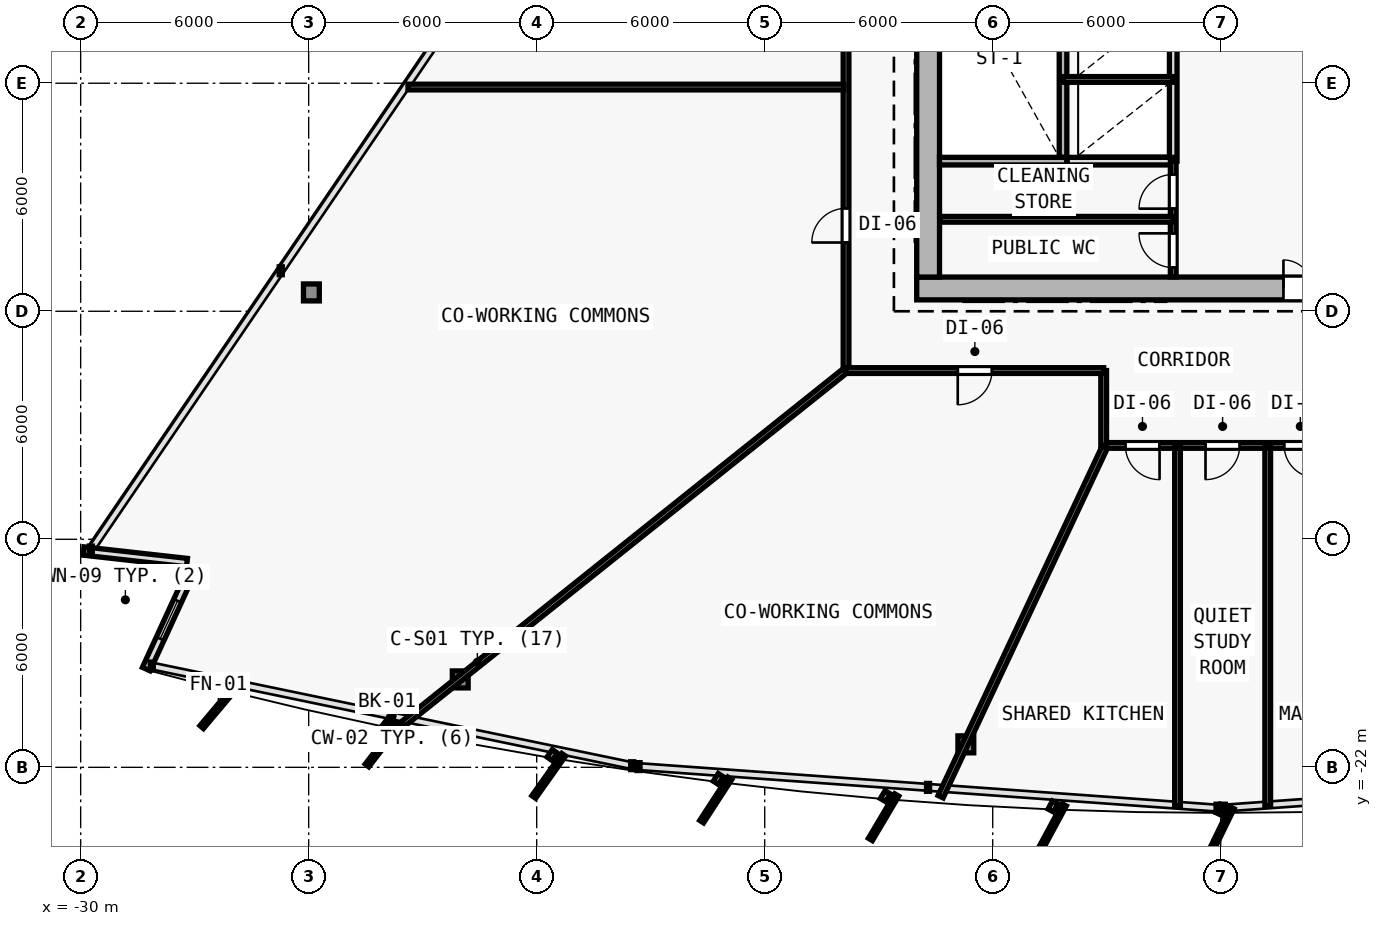
"""IFC4 building model, lengths in metres.
Left out: names, types, materials, properties, quantities, classifications, styles, units other than length and angle.
Written with IfcOpenShell. Run it as: python <this file> out.ifc"""

import sys

from ifc_helpers import new_model, si_unit, direction, frame, frame_2d, origin, origin_2d, place, context, subcontext, project, spatial, rectangle, i_section, extrude, element, fill, save


model = new_model("IFC4")
c1 = context("Model", 3, precision=1e-05, world=origin(), true_north=direction((0.0, 1.0)))
c2 = subcontext(c1, "Body", "Model", "MODEL_VIEW")
j1 = project(units=[si_unit("LENGTHUNIT", "METRE"), si_unit("PLANEANGLEUNIT", "RADIAN")], contexts=[c1])
p1 = place(None, origin())
s1 = spatial("IfcSite", under=j1, at=p1, CompositionType="ELEMENT")
p2 = place(p1, origin())
s2 = spatial("IfcBuilding", under=s1, at=p2, CompositionType="ELEMENT")
p3 = place(p2, frame((0.0, 0.0, 44.4)))
s3 = spatial("IfcBuildingStorey", under=s2, at=p3, CompositionType="ELEMENT", Elevation=44.4)
for number, where, z_axis, x_axis in (
    (1, (-7.7, -9.4, 0.0), (0.0, 0.0, 1.0), (1.0, 0.0, 0.0)),
    (2, (0.0, -9.4, 0.0), (0.0, 0.0, 1.0), (1.0, 0.0, 0.0)),
):
    element("IfcColumn", number, at=place(p3, frame(where, z_axis=z_axis, x_axis=x_axis)), inside=s3, PredefinedType="COLUMN", context=c2, shape_type="SweptSolid", body=[
        extrude(i_section(OverallWidth=0.416, OverallDepth=0.446, WebThickness=0.025, FlangeThickness=0.04, FilletRadius=0.015, at=origin_2d()), origin(), (0.0, 0.0, 1.0), 3.6),
    ])
p4 = place(p3, frame((-20.012, -19.687, 0.006), z_axis=(0.020596245868, 0.03357935795, 0.999223809452), x_axis=(-0.852427604955, 0.522845271865, 0.0)))
e3 = element("IfcColumn", 3, at=p4, inside=s3, PredefinedType="COLUMN", context=c2, shape_type="SweptSolid", body=[
    extrude(i_section(OverallWidth=0.416, OverallDepth=0.446, WebThickness=0.025, FlangeThickness=0.04, FilletRadius=0.015, at=origin_2d()), origin(), (0.0, 0.0, 1.0), 3.592),
])
p5 = place(p3, frame((-6.707, -21.395, 0.006), z_axis=(0.006934288159, 0.035283289748, 0.999353293441), x_axis=(-0.981229659911, 0.192842823335, 0.0)))
e4 = element("IfcColumn", 4, at=p5, inside=s3, PredefinedType="COLUMN", context=c2, shape_type="SweptSolid", body=[
    extrude(i_section(OverallWidth=0.416, OverallDepth=0.446, WebThickness=0.025, FlangeThickness=0.04, FilletRadius=0.015, at=origin_2d()), origin(), (0.0, 0.0, 1.0), 3.591),
])
p6 = place(p3, frame((-23.929, -9.504, 0.006), z_axis=(0.025224163578, 0.021620711639, 0.999447990843), x_axis=(-0.650791373456, 0.759256602365, 0.0)))
e5 = element("IfcColumn", 5, at=p6, inside=s3, PredefinedType="COLUMN", context=c2, shape_type="SweptSolid", body=[
    extrude(i_section(OverallWidth=0.416, OverallDepth=0.446, WebThickness=0.025, FlangeThickness=0.04, FilletRadius=0.015, at=origin_2d()), origin(), (0.0, 0.0, 1.0), 3.591),
])
p7 = place(p3, frame((-27.202, -16.612, 0.0), z_axis=(0.0, 0.0, 1.0), x_axis=(-0.993822658088, 0.110979837223, 0.0)))
e6 = element("IfcWall", 6, at=p7, inside=s3, PredefinedType="SOLIDWALL", context=c2, shape_type="SweptSolid", body=[
    extrude(rectangle(XDim=2.737, YDim=0.22, at=frame_2d((1.368, 0.0))), origin(), (0.0, 0.0, 1.0), 3.35),
])
p8 = place(p3, frame((-28.274, -19.414, 0.0), z_axis=(0.0, 0.0, 1.0), x_axis=(0.417521186742, 0.908667188041, 0.0)))
e7 = element("IfcWall", 7, at=p8, inside=s3, PredefinedType="SOLIDWALL", context=c2, shape_type="SweptSolid", body=[
    extrude(rectangle(XDim=2.852, YDim=0.22, at=frame_2d((1.426, 0.0))), origin(), (0.0, 0.0, 1.0), 3.35),
])
p9 = place(p8, frame((0.876, 0.0, 0.62)))
e8 = element("IfcOpeningElement", 8, at=p9, cuts=e7, PredefinedType="OPENING", context=c2, shape_type="SweptSolid", body=[
    extrude(rectangle(XDim=1.1, YDim=1.8, at=frame_2d((0.55, 0.9))), frame((0.0, 0.12, 0.0), z_axis=(0.0, -1.0, 0.0), x_axis=(1.0, 0.0, 0.0)), (0.0, 0.0, 1.0), 0.24),
])
p10 = place(p3, frame((-8.0, -9.4, 0.0), z_axis=(0.0, 0.0, 1.0), x_axis=(1.0, 0.0, 0.0)))
e9 = element("IfcWall", 9, at=p10, inside=s3, PredefinedType="SHEAR", context=c2, shape_type="SweptSolid", body=[
    extrude(rectangle(XDim=16.0, YDim=0.6, at=frame_2d((8.0, 0.0))), origin(), (0.0, 0.0, 1.0), 3.35),
])
p11 = place(p10, frame((9.65, 0.0, 0.0)))
e10 = element("IfcOpeningElement", 10, at=p11, cuts=e9, PredefinedType="OPENING", context=c2, shape_type="SweptSolid", body=[
    extrude(rectangle(XDim=1.5, YDim=2.2, at=frame_2d((0.75, 1.1))), frame((0.0, 0.31, 0.0), z_axis=(0.0, -1.0, 0.0), x_axis=(1.0, 0.0, 0.0)), (0.0, 0.0, 1.0), 0.62),
])
p12 = place(p3, frame((-7.7, -9.1, 0.0), z_axis=(0.0, 0.0, 1.0), x_axis=(0.0, 1.0, 0.0)))
e11 = element("IfcWall", 11, at=p12, inside=s3, PredefinedType="SHEAR", context=c2, shape_type="SweptSolid", body=[
    extrude(rectangle(XDim=19.0, YDim=0.6, at=frame_2d((9.5, 0.0))), origin(), (0.0, 0.0, 1.0), 3.35),
])
p13 = place(p12, frame((12.65, 0.0, 0.0)))
e12 = element("IfcOpeningElement", 12, at=p13, cuts=e11, PredefinedType="OPENING", context=c2, shape_type="SweptSolid", body=[
    extrude(rectangle(XDim=1.1, YDim=2.15, at=frame_2d((0.55, 1.075))), frame((0.0, 0.31, 0.0), z_axis=(0.0, -1.0, 0.0), x_axis=(1.0, 0.0, 0.0)), (0.0, 0.0, 1.0), 0.62),
])
p14 = place(p3, frame((-4.15, -5.95, 0.0), z_axis=(0.0, 0.0, 1.0), x_axis=(0.0, 1.0, 0.0)))
e13 = element("IfcWall", 13, at=p14, inside=s3, PredefinedType="SOLIDWALL", context=c2, shape_type="SweptSolid", body=[
    extrude(rectangle(XDim=7.2, YDim=0.2, at=frame_2d((3.6, 0.0))), origin(), (0.0, 0.0, 1.0), 3.35),
])
p15 = place(p3, frame((-1.25, -6.05, 0.0), z_axis=(0.0, 0.0, 1.0), x_axis=(0.0, 1.0, 0.0)))
e14 = element("IfcWall", 14, at=p15, inside=s3, PredefinedType="SOLIDWALL", context=c2, shape_type="SweptSolid", body=[
    extrude(rectangle(XDim=8.7, YDim=0.2, at=frame_2d((4.35, 0.0))), origin(), (0.0, 0.0, 1.0), 3.35),
])
p16 = place(p3, frame((-4.15, -3.9, 0.0), z_axis=(0.0, 0.0, 1.0), x_axis=(1.0, 0.0, 0.0)))
e15 = element("IfcWall", 15, at=p16, inside=s3, PredefinedType="PARTITIONING", context=c2, shape_type="SweptSolid", body=[
    extrude(rectangle(XDim=2.9, YDim=0.15, at=frame_2d((1.45, 0.0))), origin(), (0.0, 0.0, 1.0), 3.35),
])
p17 = place(p3, frame((-7.4, -6.05, 0.0), z_axis=(0.0, 0.0, 1.0), x_axis=(1.0, 0.0, 0.0)))
e16 = element("IfcWall", 16, at=p17, inside=s3, PredefinedType="SOLIDWALL", context=c2, shape_type="SweptSolid", body=[
    extrude(rectangle(XDim=3.35, YDim=0.2, at=frame_2d((1.675, 0.0))), origin(), (0.0, 0.0, 1.0), 3.35),
])
p18 = place(p3, frame((-4.04, -6.05, 0.0), z_axis=(0.0, 0.0, 1.0), x_axis=(1.0, 0.0, 0.0)))
e17 = element("IfcWall", 17, at=p18, inside=s3, PredefinedType="SOLIDWALL", context=c2, shape_type="SweptSolid", body=[
    extrude(rectangle(XDim=2.79, YDim=0.2, at=frame_2d((1.395, 0.0))), origin(), (0.0, 0.0, 1.0), 3.35),
])
p19 = place(p3, frame((-1.25, -9.095, 0.0), z_axis=(0.0, 0.0, 1.0), x_axis=(0.0, 1.0, 0.0)))
e18 = element("IfcWall", 18, at=p19, inside=s3, PredefinedType="PARTITIONING", context=c2, shape_type="SweptSolid", body=[
    extrude(rectangle(XDim=3.045, YDim=0.15, at=frame_2d((1.522, 0.0))), origin(), (0.0, 0.0, 1.0), 3.35),
])
p20 = place(p19, frame((1.795, 0.0, 0.0)))
e19 = element("IfcOpeningElement", 19, at=p20, cuts=e18, PredefinedType="OPENING", context=c2, shape_type="SweptSolid", body=[
    extrude(rectangle(XDim=0.9, YDim=2.1, at=frame_2d((0.45, 1.05))), frame((0.0, 0.085, 0.0), z_axis=(0.0, -1.0, 0.0), x_axis=(1.0, 0.0, 0.0)), (0.0, 0.0, 1.0), 0.17),
])
p21 = place(p19, frame((0.245, 0.0, 0.0)))
e20 = element("IfcOpeningElement", 20, at=p21, cuts=e18, PredefinedType="OPENING", context=c2, shape_type="SweptSolid", body=[
    extrude(rectangle(XDim=0.9, YDim=2.1, at=frame_2d((0.45, 1.05))), frame((0.0, 0.085, 0.0), z_axis=(0.0, -1.0, 0.0), x_axis=(1.0, 0.0, 0.0)), (0.0, 0.0, 1.0), 0.17),
])
p22 = place(p3, frame((-7.395, -7.58, 0.0), z_axis=(0.0, 0.0, 1.0), x_axis=(1.0, 0.0, 0.0)))
e21 = element("IfcWall", 21, at=p22, inside=s3, PredefinedType="PARTITIONING", context=c2, shape_type="SweptSolid", body=[
    extrude(rectangle(XDim=6.145, YDim=0.15, at=frame_2d((3.073, 0.0))), origin(), (0.0, 0.0, 1.0), 3.35),
])
p23 = place(p3, frame((-9.86, -11.56, 0.0), z_axis=(0.0, 0.0, 1.0), x_axis=(0.0, 1.0, 0.0)))
e22 = element("IfcWall", 22, at=p23, inside=s3, PredefinedType="PARTITIONING", context=c2, shape_type="SweptSolid", body=[
    extrude(rectangle(XDim=19.986, YDim=0.15, at=frame_2d((9.993, 0.0))), origin(), (0.0, 0.0, 1.0), 2.609),
])
p24 = place(p23, frame((10.231, 0.0, 0.0)))
e23 = element("IfcOpeningElement", 23, at=p24, cuts=e22, PredefinedType="OPENING", context=c2, shape_type="SweptSolid", body=[
    extrude(rectangle(XDim=0.9, YDim=2.1, at=frame_2d((0.45, 1.05))), frame((0.0, 0.085, 0.0), z_axis=(0.0, -1.0, 0.0), x_axis=(1.0, 0.0, 0.0)), (0.0, 0.0, 1.0), 0.17),
])
p25 = place(p23, frame((3.369, 0.0, 0.0)))
e24 = element("IfcOpeningElement", 24, at=p25, cuts=e22, PredefinedType="OPENING", context=c2, shape_type="SweptSolid", body=[
    extrude(rectangle(XDim=0.9, YDim=2.1, at=frame_2d((0.45, 1.05))), frame((0.0, 0.085, 0.0), z_axis=(0.0, -1.0, 0.0), x_axis=(1.0, 0.0, 0.0)), (0.0, 0.0, 1.0), 0.17),
])
p26 = place(p23, frame((17.979, 0.0, 0.0)))
e25 = element("IfcOpeningElement", 25, at=p26, cuts=e22, PredefinedType="OPENING", context=c2, shape_type="SweptSolid", body=[
    extrude(rectangle(XDim=0.9, YDim=2.1, at=frame_2d((0.45, 1.05))), frame((0.0, 0.085, 0.0), z_axis=(0.0, -1.0, 0.0), x_axis=(1.0, 0.0, 0.0)), (0.0, 0.0, 1.0), 0.17),
])
p27 = place(p23, frame((15.027, 0.0, 0.0)))
e26 = element("IfcOpeningElement", 26, at=p27, cuts=e22, PredefinedType="OPENING", context=c2, shape_type="SweptSolid", body=[
    extrude(rectangle(XDim=0.9, YDim=2.1, at=frame_2d((0.45, 1.05))), frame((0.0, 0.085, 0.0), z_axis=(0.0, -1.0, 0.0), x_axis=(1.0, 0.0, 0.0)), (0.0, 0.0, 1.0), 0.17),
])
p28 = place(p3, frame((3.08, -13.53, 0.0), z_axis=(0.0, 0.0, 1.0), x_axis=(-1.0, 0.0, 0.0)))
e27 = element("IfcWall", 27, at=p28, inside=s3, PredefinedType="PARTITIONING", context=c2, shape_type="SweptSolid", body=[
    extrude(rectangle(XDim=6.16, YDim=0.15, at=frame_2d((3.08, 0.0))), origin(), (0.0, 0.0, 1.0), 2.725),
])
p29 = place(p28, frame((4.69, 0.0, 0.0)))
e28 = element("IfcOpeningElement", 28, at=p29, cuts=e27, PredefinedType="OPENING", context=c2, shape_type="SweptSolid", body=[
    extrude(rectangle(XDim=0.9, YDim=2.1, at=frame_2d((0.45, 1.05))), frame((0.0, 0.085, 0.0), z_axis=(0.0, -1.0, 0.0), x_axis=(1.0, 0.0, 0.0)), (0.0, 0.0, 1.0), 0.17),
])
p30 = place(p28, frame((2.581, 0.0, 0.0)))
e29 = element("IfcOpeningElement", 29, at=p30, cuts=e27, PredefinedType="OPENING", context=c2, shape_type="SweptSolid", body=[
    extrude(rectangle(XDim=0.9, YDim=2.1, at=frame_2d((0.45, 1.05))), frame((0.0, 0.085, 0.0), z_axis=(0.0, -1.0, 0.0), x_axis=(1.0, 0.0, 0.0)), (0.0, 0.0, 1.0), 0.17),
])
p31 = place(p28, frame((0.561, 0.0, 0.0)))
e30 = element("IfcOpeningElement", 30, at=p31, cuts=e27, PredefinedType="OPENING", context=c2, shape_type="SweptSolid", body=[
    extrude(rectangle(XDim=0.85, YDim=2.1, at=frame_2d((0.425, 1.05))), frame((0.0, 0.085, 0.0), z_axis=(0.0, -1.0, 0.0), x_axis=(1.0, 0.0, 0.0)), (0.0, 0.0, 1.0), 0.17),
])
p32 = place(p3, frame((-3.08, -13.53, 0.0), z_axis=(0.0, 0.0, 1.0), x_axis=(0.0, 1.0, 0.0)))
e31 = element("IfcWall", 31, at=p32, inside=s3, PredefinedType="PARTITIONING", context=c2, shape_type="SweptSolid", body=[
    extrude(rectangle(XDim=1.97, YDim=0.15, at=frame_2d((0.985, 0.0))), origin(), (0.0, 0.0, 1.0), 2.925),
])
p33 = place(p3, frame((-3.08, -11.56, 0.0), z_axis=(0.0, 0.0, 1.0), x_axis=(-1.0, 0.0, 0.0)))
e32 = element("IfcWall", 32, at=p33, inside=s3, PredefinedType="PARTITIONING", context=c2, shape_type="SweptSolid", body=[
    extrude(rectangle(XDim=6.78, YDim=0.15, at=frame_2d((3.39, 0.0))), origin(), (0.0, 0.0, 1.0), 2.725),
])
p34 = place(p33, frame((2.94, 0.0, 0.0)))
e33 = element("IfcOpeningElement", 33, at=p34, cuts=e32, PredefinedType="OPENING", context=c2, shape_type="SweptSolid", body=[
    extrude(rectangle(XDim=0.9, YDim=2.1, at=frame_2d((0.45, 1.05))), frame((0.0, 0.085, 0.0), z_axis=(0.0, -1.0, 0.0), x_axis=(1.0, 0.0, 0.0)), (0.0, 0.0, 1.0), 0.17),
])
p35 = place(p3, frame((-9.888, -11.569, 0.0), z_axis=(0.0, 0.0, 1.0), x_axis=(-0.781299107074, -0.624156795433, 0.0)))
e34 = element("IfcWall", 34, at=p35, inside=s3, PredefinedType="PARTITIONING", context=c2, shape_type="SweptSolid", body=[
    extrude(rectangle(XDim=14.884, YDim=0.15, at=frame_2d((7.442, 0.0))), origin(), (0.0, 0.0, 1.0), 2.725),
])
p36 = place(p3, frame((-3.053, -13.579, 0.0), z_axis=(0.0, 0.0, 1.0), x_axis=(-0.425109320036, -0.905142014282, 0.0)))
e35 = element("IfcWall", 35, at=p36, inside=s3, PredefinedType="PARTITIONING", context=c2, shape_type="SweptSolid", body=[
    extrude(rectangle(XDim=10.157, YDim=0.15, at=frame_2d((5.079, 0.0))), origin(), (0.0, 0.0, 1.0), 2.725),
])
p37 = place(p3, frame((-1.137, -13.59, 0.0), z_axis=(0.0, 0.0, 1.0), x_axis=(0.0, -1.0, 0.0)))
e36 = element("IfcWall", 36, at=p37, inside=s3, PredefinedType="PARTITIONING", context=c2, shape_type="SweptSolid", body=[
    extrude(rectangle(XDim=9.428, YDim=0.15, at=frame_2d((4.714, 0.0))), origin(), (0.0, 0.0, 1.0), 2.735),
])
p38 = place(p3, frame((-9.92, -4.1, 0.0), z_axis=(0.0, 0.0, 1.0), x_axis=(-1.0, 0.0, 0.0)))
e37 = element("IfcWall", 37, at=p38, inside=s3, PredefinedType="PARTITIONING", context=c2, shape_type="SweptSolid", body=[
    extrude(rectangle(XDim=11.467, YDim=0.15, at=frame_2d((5.733, 0.0))), origin(), (0.0, 0.0, 1.0), 2.735),
])
p39 = place(p3, frame((1.236, -13.59, 0.0), z_axis=(0.0, 0.0, 1.0), x_axis=(0.0, -1.0, 0.0)))
e38 = element("IfcWall", 38, at=p39, inside=s3, PredefinedType="PARTITIONING", context=c2, shape_type="SweptSolid", body=[
    extrude(rectangle(XDim=9.427, YDim=0.15, at=frame_2d((4.714, 0.0))), origin(), (0.0, 0.0, 1.0), 2.735),
])
p40 = place(p9, origin())
e39 = element("IfcWindow", 39, at=p40, inside=s3, PartitioningType="SINGLE_PANEL", PredefinedType="WINDOW", context=c2, shape_type="SweptSolid", body=[
    extrude(rectangle(XDim=1.1, YDim=1.8, at=frame_2d((0.55, 0.9))), frame((0.0, 0.03, 0.0), z_axis=(0.0, -1.0, 0.0), x_axis=(1.0, 0.0, 0.0)), (0.0, 0.0, 1.0), 0.06),
])
fill(e8, e39)
p41 = place(p11, origin())
e40 = element("IfcDoor", 40, at=p41, inside=s3, OperationType="DOUBLE_DOOR_SINGLE_SWING", PredefinedType="DOOR", context=c2, shape_type="SweptSolid", body=[
    extrude(rectangle(XDim=1.5, YDim=2.2, at=frame_2d((0.75, 1.1))), frame((0.0, 0.025, 0.0), z_axis=(0.0, -1.0, 0.0), x_axis=(1.0, 0.0, 0.0)), (0.0, 0.0, 1.0), 0.05),
])
fill(e10, e40)
p42 = place(p20, origin())
e41 = element("IfcDoor", 41, at=p42, inside=s3, OperationType="SINGLE_SWING_LEFT", PredefinedType="DOOR", context=c2, shape_type="SweptSolid", body=[
    extrude(rectangle(XDim=0.9, YDim=2.1, at=frame_2d((0.45, 1.05))), frame((0.0, 0.025, 0.0), z_axis=(0.0, -1.0, 0.0), x_axis=(1.0, 0.0, 0.0)), (0.0, 0.0, 1.0), 0.05),
])
fill(e19, e41)
p43 = place(p21, origin())
e42 = element("IfcDoor", 42, at=p43, inside=s3, OperationType="SINGLE_SWING_RIGHT", PredefinedType="DOOR", context=c2, shape_type="SweptSolid", body=[
    extrude(rectangle(XDim=0.9, YDim=2.1, at=frame_2d((0.45, 1.05))), frame((0.0, 0.025, 0.0), z_axis=(0.0, -1.0, 0.0), x_axis=(1.0, 0.0, 0.0)), (0.0, 0.0, 1.0), 0.05),
])
fill(e20, e42)
p44 = place(p25, origin())
e43 = element("IfcDoor", 43, at=p44, inside=s3, OperationType="SINGLE_SWING_LEFT", PredefinedType="DOOR", context=c2, shape_type="SweptSolid", body=[
    extrude(rectangle(XDim=0.9, YDim=2.1, at=frame_2d((0.45, 1.05))), frame((0.0, 0.025, 0.0), z_axis=(0.0, -1.0, 0.0), x_axis=(1.0, 0.0, 0.0)), (0.0, 0.0, 1.0), 0.05),
])
fill(e24, e43)
p45 = place(p34, origin())
e44 = element("IfcDoor", 44, at=p45, inside=s3, OperationType="SINGLE_SWING_RIGHT", PredefinedType="DOOR", context=c2, shape_type="SweptSolid", body=[
    extrude(rectangle(XDim=0.9, YDim=2.1, at=frame_2d((0.45, 1.05))), frame((0.0, 0.025, 0.0), z_axis=(0.0, -1.0, 0.0), x_axis=(1.0, 0.0, 0.0)), (0.0, 0.0, 1.0), 0.05),
])
fill(e33, e44)
p46 = place(p29, origin())
e45 = element("IfcDoor", 45, at=p46, inside=s3, OperationType="SINGLE_SWING_LEFT", PredefinedType="DOOR", context=c2, shape_type="SweptSolid", body=[
    extrude(rectangle(XDim=0.9, YDim=2.1, at=frame_2d((0.45, 1.05))), frame((0.0, 0.025, 0.0), z_axis=(0.0, -1.0, 0.0), x_axis=(1.0, 0.0, 0.0)), (0.0, 0.0, 1.0), 0.05),
])
fill(e28, e45)
p47 = place(p30, origin())
e46 = element("IfcDoor", 46, at=p47, inside=s3, OperationType="SINGLE_SWING_RIGHT", PredefinedType="DOOR", context=c2, shape_type="SweptSolid", body=[
    extrude(rectangle(XDim=0.9, YDim=2.1, at=frame_2d((0.45, 1.05))), frame((0.0, 0.025, 0.0), z_axis=(0.0, -1.0, 0.0), x_axis=(1.0, 0.0, 0.0)), (0.0, 0.0, 1.0), 0.05),
])
fill(e29, e46)
p48 = place(p31, origin())
e47 = element("IfcDoor", 47, at=p48, inside=s3, OperationType="SINGLE_SWING_LEFT", PredefinedType="DOOR", context=c2, shape_type="SweptSolid", body=[
    extrude(rectangle(XDim=0.85, YDim=2.1, at=frame_2d((0.425, 1.05))), frame((0.0, 0.025, 0.0), z_axis=(0.0, -1.0, 0.0), x_axis=(1.0, 0.0, 0.0)), (0.0, 0.0, 1.0), 0.05),
])
fill(e30, e47)
save(model, sys.argv[1])
